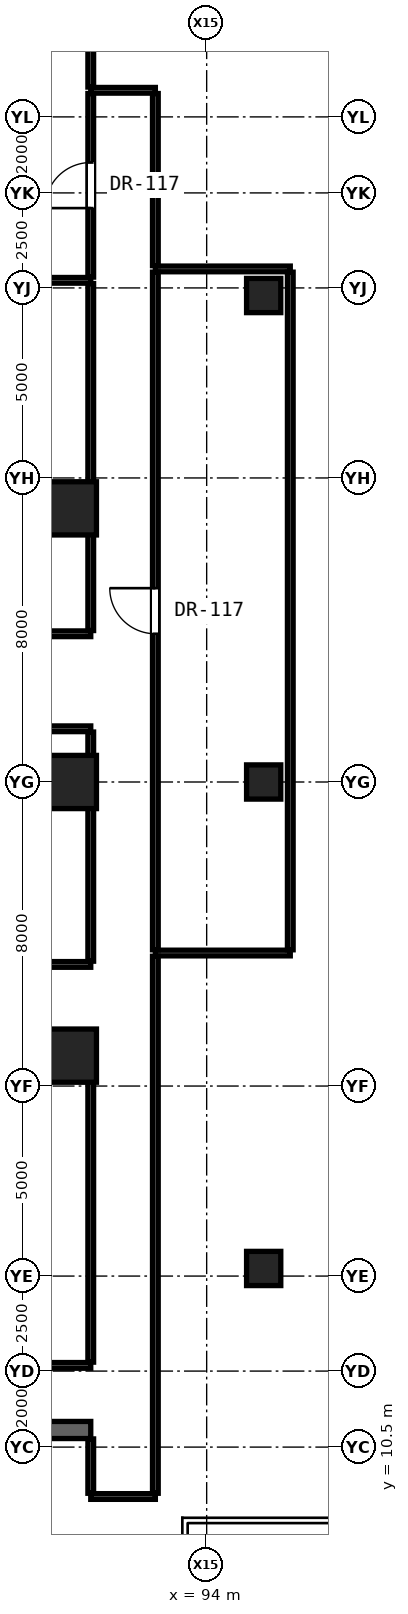
"""IFC4 building model, lengths in metres.
Left out: names, types, materials, properties, quantities, classifications, styles, units other than length and angle.
Written with IfcOpenShell. Run it as: python <this file> out.ifc"""

import sys

from ifc_helpers import new_model, si_unit, direction, frame, frame_2d, origin, origin_2d, place, context, subcontext, project, spatial, rectangle, hollow_rectangle, extrude, element, fill, save


model = new_model("IFC4")
c1 = context("Model", 3, precision=1e-05, world=origin(), true_north=direction((0.0, 1.0)))
c2 = subcontext(c1, "Body", "Model", "MODEL_VIEW")
j1 = project(units=[si_unit("LENGTHUNIT", "METRE"), si_unit("PLANEANGLEUNIT", "RADIAN")], contexts=[c1])
p1 = place(None, origin())
s1 = spatial("IfcSite", under=j1, at=p1, CompositionType="ELEMENT")
p2 = place(p1, origin())
s2 = spatial("IfcBuilding", under=s1, at=p2, CompositionType="ELEMENT")
p3 = place(p2, frame((0.0, 0.0, 9.5)))
s3 = spatial("IfcBuildingStorey", under=s2, at=p3, CompositionType="ELEMENT", Elevation=9.5)
for number, where, z_axis, x_axis in (
    (1, (90.4, 20.8, 0.0), (0.0, 0.0, 1.0), (1.0, 0.0, 0.0)),
    (2, (90.4, 28.0, 0.0), (0.0, 0.0, 1.0), (1.0, 0.0, 0.0)),
    (3, (90.4, 35.2, 0.0), (0.0, 0.0, 1.0), (1.0, 0.0, 0.0)),
):
    element("IfcColumn", number, at=place(p3, frame(where, z_axis=z_axis, x_axis=x_axis)), inside=s3, PredefinedType="COLUMN", context=c2, shape_type="SweptSolid", body=[
        extrude(hollow_rectangle(XDim=1.4, YDim=1.4, WallThickness=0.08, at=origin_2d()), origin(), (0.0, 0.0, 1.0), 4.3),
    ])
for number, where, z_axis, x_axis in (
    (4, (95.5, 15.2, 0.0), (0.0, 0.0, 1.0), (1.0, 0.0, 0.0)),
    (5, (95.5, 28.0, 0.0), (0.0, 0.0, 1.0), (1.0, 0.0, 0.0)),
    (6, (95.5, 40.8, 0.0), (0.0, 0.0, 1.0), (1.0, 0.0, 0.0)),
):
    element("IfcColumn", number, at=place(p3, frame(where, z_axis=z_axis, x_axis=x_axis)), inside=s3, PredefinedType="COLUMN", context=c2, shape_type="SweptSolid", body=[
        extrude(rectangle(XDim=0.9, YDim=0.9, at=origin_2d()), origin(), (0.0, 0.0, 1.0), 4.3),
    ])
p4 = place(p3, frame((90.95, 9.2, 0.0), z_axis=(0.0, 0.0, 1.0), x_axis=(1.0, 0.0, 0.0)))
e7 = element("IfcWall", 7, at=p4, inside=s3, PredefinedType="PARTITIONING", context=c2, shape_type="SweptSolid", body=[
    extrude(rectangle(XDim=1.7, YDim=0.15, at=frame_2d((0.85, 0.0))), origin(), (0.0, 0.0, 1.0), 3.98),
])
p5 = place(p3, frame((61.8, 10.95, 0.0), z_axis=(0.0, 0.0, 1.0), x_axis=(1.0, 0.0, 0.0)))
e8 = element("IfcWall", 8, at=p5, inside=s3, PredefinedType="SHEAR", context=c2, shape_type="SweptSolid", body=[
    extrude(rectangle(XDim=29.15, YDim=0.45, at=frame_2d((14.575, 0.0))), origin(), (0.0, 0.0, 1.0), 3.98),
])
p6 = place(p5, frame((7.57, 0.0, 0.0)))
e9 = element("IfcOpeningElement", 9, at=p6, cuts=e8, PredefinedType="OPENING", context=c2, shape_type="SweptSolid", body=[
    extrude(rectangle(XDim=1.15, YDim=2.2, at=frame_2d((0.575, 1.1))), frame((0.0, 0.235, 0.0), z_axis=(0.0, -1.0, 0.0), x_axis=(1.0, 0.0, 0.0)), (0.0, 0.0, 1.0), 0.47),
])
p7 = place(p5, frame((2.77, 0.0, 0.0)))
e10 = element("IfcOpeningElement", 10, at=p7, cuts=e8, PredefinedType="OPENING", context=c2, shape_type="SweptSolid", body=[
    extrude(rectangle(XDim=1.2, YDim=2.25, at=frame_2d((0.6, 1.125))), frame((0.0, 0.235, 0.0), z_axis=(0.0, -1.0, 0.0), x_axis=(1.0, 0.0, 0.0)), (0.0, 0.0, 1.0), 0.47),
])
p8 = place(p3, frame((61.8, 12.65, 0.0), z_axis=(0.0, 0.0, 1.0), x_axis=(1.0, 0.0, 0.0)))
e11 = element("IfcWall", 11, at=p8, inside=s3, PredefinedType="PARTITIONING", context=c2, shape_type="SweptSolid", body=[
    extrude(rectangle(XDim=29.15, YDim=0.15, at=frame_2d((14.575, 0.0))), origin(), (0.0, 0.0, 1.0), 3.116),
])
p9 = place(p3, frame((85.37, 20.8, 0.0), z_axis=(0.0, 0.0, 1.0), x_axis=(1.0, 0.0, 0.0)))
e12 = element("IfcWall", 12, at=p9, inside=s3, PredefinedType="PARTITIONING", context=c2, shape_type="SweptSolid", body=[
    extrude(rectangle(XDim=5.58, YDim=0.15, at=frame_2d((2.79, 0.0))), origin(), (0.0, 0.0, 1.0), 2.872),
])
p10 = place(p3, frame((61.8, 23.2, 0.0), z_axis=(0.0, 0.0, 1.0), x_axis=(1.0, 0.0, 0.0)))
e13 = element("IfcWall", 13, at=p10, inside=s3, PredefinedType="PARTITIONING", context=c2, shape_type="SweptSolid", body=[
    extrude(rectangle(XDim=29.15, YDim=0.15, at=frame_2d((14.575, 0.0))), origin(), (0.0, 0.0, 1.0), 3.045),
])
p11 = place(p10, frame((6.225, 0.0, 0.0)))
e14 = element("IfcOpeningElement", 14, at=p11, cuts=e13, PredefinedType="OPENING", context=c2, shape_type="SweptSolid", body=[
    extrude(rectangle(XDim=0.9, YDim=2.1, at=frame_2d((0.45, 1.05))), frame((0.0, 0.085, 0.0), z_axis=(0.0, -1.0, 0.0), x_axis=(1.0, 0.0, 0.0)), (0.0, 0.0, 1.0), 0.17),
])
p12 = place(p10, frame((15.075, 0.0, 0.0)))
e15 = element("IfcOpeningElement", 15, at=p12, cuts=e13, PredefinedType="OPENING", context=c2, shape_type="SweptSolid", body=[
    extrude(rectangle(XDim=1.2, YDim=2.25, at=frame_2d((0.6, 1.125))), frame((0.0, 0.085, 0.0), z_axis=(0.0, -1.0, 0.0), x_axis=(1.0, 0.0, 0.0)), (0.0, 0.0, 1.0), 0.17),
])
p13 = place(p3, frame((92.65, 23.5, 0.0), z_axis=(0.0, 0.0, 1.0), x_axis=(1.0, 0.0, 0.0)))
e16 = element("IfcWall", 16, at=p13, inside=s3, PredefinedType="PARTITIONING", context=c2, shape_type="SweptSolid", body=[
    extrude(rectangle(XDim=3.55, YDim=0.15, at=frame_2d((1.775, 0.0))), origin(), (0.0, 0.0, 1.0), 3.116),
])
p14 = place(p3, frame((85.22, 29.4, 0.0), z_axis=(0.0, 0.0, 1.0), x_axis=(1.0, 0.0, 0.0)))
e17 = element("IfcWall", 17, at=p14, inside=s3, PredefinedType="PARTITIONING", context=c2, shape_type="SweptSolid", body=[
    extrude(rectangle(XDim=5.73, YDim=0.15, at=frame_2d((2.865, 0.0))), origin(), (0.0, 0.0, 1.0), 3.116),
])
p15 = place(p3, frame((72.85, 31.9, 0.0), z_axis=(0.0, 0.0, 1.0), x_axis=(1.0, 0.0, 0.0)))
e18 = element("IfcWall", 18, at=p15, inside=s3, PredefinedType="PARTITIONING", context=c2, shape_type="SweptSolid", body=[
    extrude(rectangle(XDim=18.1, YDim=0.15, at=frame_2d((9.05, 0.0))), origin(), (0.0, 0.0, 1.0), 3.045),
])
p16 = place(p15, frame((9.21, 0.0, 0.0)))
e19 = element("IfcOpeningElement", 19, at=p16, cuts=e18, PredefinedType="OPENING", context=c2, shape_type="SweptSolid", body=[
    extrude(rectangle(XDim=1.2, YDim=2.25, at=frame_2d((0.6, 1.125))), frame((0.0, 0.085, 0.0), z_axis=(0.0, -1.0, 0.0), x_axis=(1.0, 0.0, 0.0)), (0.0, 0.0, 1.0), 0.17),
])
p17 = place(p15, frame((4.59, 0.0, 0.0)))
e20 = element("IfcOpeningElement", 20, at=p17, cuts=e18, PredefinedType="OPENING", context=c2, shape_type="SweptSolid", body=[
    extrude(rectangle(XDim=1.2, YDim=2.25, at=frame_2d((0.6, 1.125))), frame((0.0, 0.085, 0.0), z_axis=(0.0, -1.0, 0.0), x_axis=(1.0, 0.0, 0.0)), (0.0, 0.0, 1.0), 0.17),
])
p18 = place(p3, frame((85.02, 41.2, 0.0), z_axis=(0.0, 0.0, 1.0), x_axis=(1.0, 0.0, 0.0)))
e21 = element("IfcWall", 21, at=p18, inside=s3, PredefinedType="PARTITIONING", context=c2, shape_type="SweptSolid", body=[
    extrude(rectangle(XDim=5.93, YDim=0.15, at=frame_2d((2.965, 0.0))), origin(), (0.0, 0.0, 1.0), 3.116),
])
p19 = place(p3, frame((92.65, 41.5, 0.0), z_axis=(0.0, 0.0, 1.0), x_axis=(1.0, 0.0, 0.0)))
e22 = element("IfcWall", 22, at=p19, inside=s3, PredefinedType="PARTITIONING", context=c2, shape_type="SweptSolid", body=[
    extrude(rectangle(XDim=3.55, YDim=0.15, at=frame_2d((1.775, 0.0))), origin(), (0.0, 0.0, 1.0), 3.98),
])
p20 = place(p3, frame((90.95, 46.2, 0.0), z_axis=(0.0, 0.0, 1.0), x_axis=(1.0, 0.0, 0.0)))
e23 = element("IfcWall", 23, at=p20, inside=s3, PredefinedType="PARTITIONING", context=c2, shape_type="SweptSolid", body=[
    extrude(rectangle(XDim=1.7, YDim=0.15, at=frame_2d((0.85, 0.0))), origin(), (0.0, 0.0, 1.0), 3.98),
])
p21 = place(p3, frame((90.95, 9.285, 0.0), z_axis=(0.0, 0.0, 1.0), x_axis=(0.0, 1.0, 0.0)))
e24 = element("IfcWall", 24, at=p21, inside=s3, PredefinedType="PARTITIONING", context=c2, shape_type="SweptSolid", body=[
    extrude(rectangle(XDim=1.43, YDim=0.15, at=frame_2d((0.715, 0.0))), origin(), (0.0, 0.0, 1.0), 3.98),
])
p22 = place(p3, frame((90.95, 12.735, 0.0), z_axis=(0.0, 0.0, 1.0), x_axis=(0.0, 1.0, 0.0)))
e25 = element("IfcWall", 25, at=p22, inside=s3, PredefinedType="PARTITIONING", context=c2, shape_type="SweptSolid", body=[
    extrude(rectangle(XDim=7.98, YDim=0.15, at=frame_2d((3.99, 0.0))), origin(), (0.0, 0.0, 1.0), 3.116),
])
p23 = place(p3, frame((90.95, 23.285, 0.0), z_axis=(0.0, 0.0, 1.0), x_axis=(0.0, 1.0, 0.0)))
e26 = element("IfcWall", 26, at=p23, inside=s3, PredefinedType="PARTITIONING", context=c2, shape_type="SweptSolid", body=[
    extrude(rectangle(XDim=6.03, YDim=0.15, at=frame_2d((3.015, 0.0))), origin(), (0.0, 0.0, 1.0), 3.199),
])
p24 = place(p3, frame((90.95, 31.985, 0.0), z_axis=(0.0, 0.0, 1.0), x_axis=(0.0, 1.0, 0.0)))
e27 = element("IfcWall", 27, at=p24, inside=s3, PredefinedType="PARTITIONING", context=c2, shape_type="SweptSolid", body=[
    extrude(rectangle(XDim=9.13, YDim=0.15, at=frame_2d((4.565, 0.0))), origin(), (0.0, 0.0, 1.0), 3.116),
])
p25 = place(p3, frame((90.95, 41.285, 0.0), z_axis=(0.0, 0.0, 1.0), x_axis=(0.0, 1.0, 0.0)))
e28 = element("IfcWall", 28, at=p25, inside=s3, PredefinedType="PARTITIONING", context=c2, shape_type="SweptSolid", body=[
    extrude(rectangle(XDim=4.83, YDim=0.15, at=frame_2d((2.415, 0.0))), origin(), (0.0, 0.0, 1.0), 3.98),
])
p26 = place(p25, frame((1.815, 0.0, 0.0)))
e29 = element("IfcOpeningElement", 29, at=p26, cuts=e28, PredefinedType="OPENING", context=c2, shape_type="SweptSolid", body=[
    extrude(rectangle(XDim=1.2, YDim=2.25, at=frame_2d((0.6, 1.125))), frame((0.0, 0.085, 0.0), z_axis=(0.0, -1.0, 0.0), x_axis=(1.0, 0.0, 0.0)), (0.0, 0.0, 1.0), 0.17),
])
p27 = place(p3, frame((90.95, 46.285, 0.0), z_axis=(0.0, 0.0, 1.0), x_axis=(0.0, 1.0, 0.0)))
e30 = element("IfcWall", 30, at=p27, inside=s3, PredefinedType="PARTITIONING", context=c2, shape_type="SweptSolid", body=[
    extrude(rectangle(XDim=2.83, YDim=0.15, at=frame_2d((1.415, 0.0))), origin(), (0.0, 0.0, 1.0), 3.98),
])
p28 = place(p3, frame((92.65, 9.285, 0.0), z_axis=(0.0, 0.0, 1.0), x_axis=(0.0, 1.0, 0.0)))
e31 = element("IfcWall", 31, at=p28, inside=s3, PredefinedType="PARTITIONING", context=c2, shape_type="SweptSolid", body=[
    extrude(rectangle(XDim=14.13, YDim=0.15, at=frame_2d((7.065, 0.0))), origin(), (0.0, 0.0, 1.0), 3.116),
])
p29 = place(p3, frame((92.65, 23.585, 0.0), z_axis=(0.0, 0.0, 1.0), x_axis=(0.0, 1.0, 0.0)))
e32 = element("IfcWall", 32, at=p29, inside=s3, PredefinedType="PARTITIONING", context=c2, shape_type="SweptSolid", body=[
    extrude(rectangle(XDim=17.83, YDim=0.15, at=frame_2d((8.915, 0.0))), origin(), (0.0, 0.0, 1.0), 3.116),
])
p30 = place(p29, frame((8.315, 0.0, 0.0)))
e33 = element("IfcOpeningElement", 33, at=p30, cuts=e32, PredefinedType="OPENING", context=c2, shape_type="SweptSolid", body=[
    extrude(rectangle(XDim=1.2, YDim=2.25, at=frame_2d((0.6, 1.125))), frame((0.0, 0.085, 0.0), z_axis=(0.0, -1.0, 0.0), x_axis=(1.0, 0.0, 0.0)), (0.0, 0.0, 1.0), 0.17),
])
p31 = place(p3, frame((92.65, 41.585, 0.0), z_axis=(0.0, 0.0, 1.0), x_axis=(0.0, 1.0, 0.0)))
e34 = element("IfcWall", 34, at=p31, inside=s3, PredefinedType="PARTITIONING", context=c2, shape_type="SweptSolid", body=[
    extrude(rectangle(XDim=4.53, YDim=0.15, at=frame_2d((2.265, 0.0))), origin(), (0.0, 0.0, 1.0), 3.98),
])
p32 = place(p3, frame((96.2, 23.585, 0.0), z_axis=(0.0, 0.0, 1.0), x_axis=(0.0, 1.0, 0.0)))
e35 = element("IfcWall", 35, at=p32, inside=s3, PredefinedType="PARTITIONING", context=c2, shape_type="SweptSolid", body=[
    extrude(rectangle(XDim=17.83, YDim=0.15, at=frame_2d((8.915, 0.0))), origin(), (0.0, 0.0, 1.0), 3.98),
])
p33 = place(p30, origin())
e36 = element("IfcDoor", 36, at=p33, inside=s3, OperationType="SINGLE_SWING_RIGHT", PredefinedType="DOOR", context=c2, shape_type="SweptSolid", body=[
    extrude(rectangle(XDim=1.2, YDim=2.25, at=frame_2d((0.6, 1.125))), frame((0.0, 0.025, 0.0), z_axis=(0.0, -1.0, 0.0), x_axis=(1.0, 0.0, 0.0)), (0.0, 0.0, 1.0), 0.05),
])
fill(e33, e36)
p34 = place(p26, origin())
e37 = element("IfcDoor", 37, at=p34, inside=s3, OperationType="SINGLE_SWING_LEFT", PredefinedType="DOOR", context=c2, shape_type="SweptSolid", body=[
    extrude(rectangle(XDim=1.2, YDim=2.25, at=frame_2d((0.6, 1.125))), frame((0.0, 0.025, 0.0), z_axis=(0.0, -1.0, 0.0), x_axis=(1.0, 0.0, 0.0)), (0.0, 0.0, 1.0), 0.05),
])
fill(e29, e37)
save(model, sys.argv[1])
